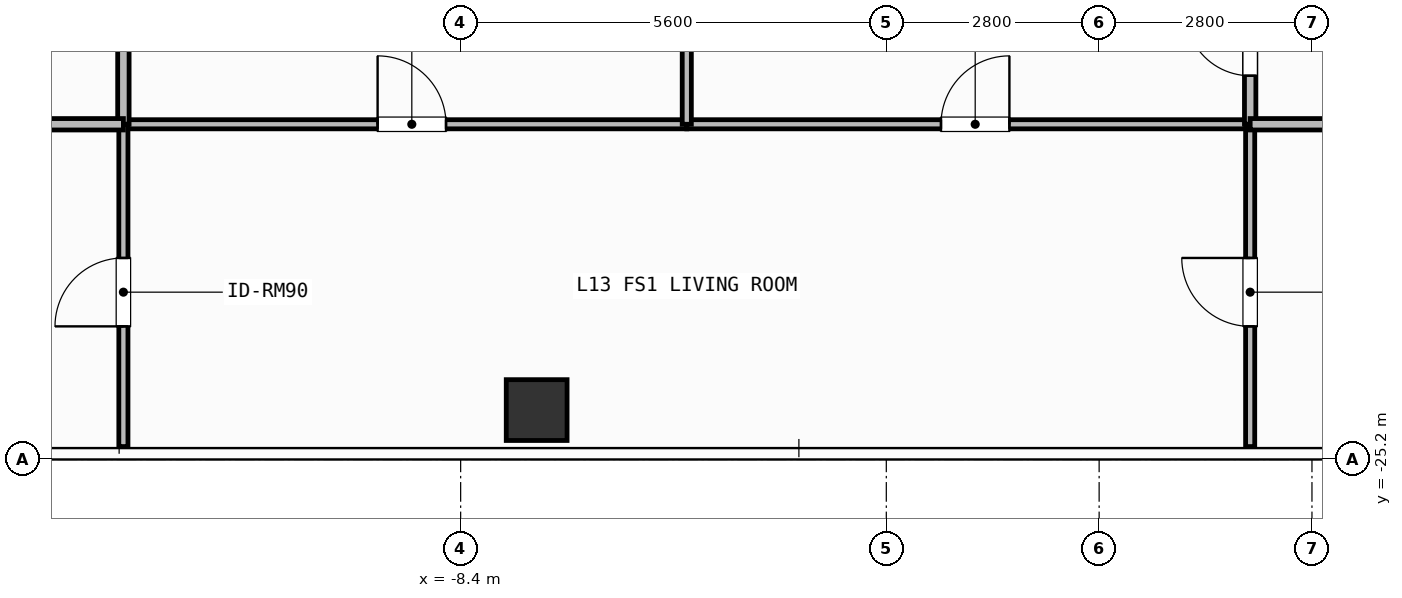
"""IFC4 building model, lengths in metres.
Left out: names, types, materials, properties, quantities, classifications, styles, units other than length and angle.
Written with IfcOpenShell. Run it as: python <this file> out.ifc"""

import sys

from ifc_helpers import new_model, si_unit, direction, frame, frame_2d, origin, origin_2d, place, context, subcontext, project, spatial, rectangle, hollow_rectangle, extrude, element, fill, save


model = new_model("IFC4")
c1 = context("Model", 3, precision=1e-05, world=origin(), true_north=direction((0.0, 1.0)))
c2 = subcontext(c1, "Body", "Model", "MODEL_VIEW")
j1 = project(units=[si_unit("LENGTHUNIT", "METRE"), si_unit("PLANEANGLEUNIT", "RADIAN")], contexts=[c1])
p1 = place(None, origin())
s1 = spatial("IfcSite", under=j1, at=p1, CompositionType="ELEMENT")
p2 = place(p1, origin())
s2 = spatial("IfcBuilding", under=s1, at=p2, CompositionType="ELEMENT")
p3 = place(p2, frame((0.0, 0.0, 50.1)))
s3 = spatial("IfcBuildingStorey", under=s2, at=p3, CompositionType="ELEMENT", Elevation=50.1)
p4 = place(p3, frame((-7.4, -24.55, 0.0), z_axis=(0.0, 0.0, 1.0), x_axis=(1.0, 0.0, 0.0)))
e1 = element("IfcColumn", 1, at=p4, inside=s3, PredefinedType="COLUMN", context=c2, shape_type="SweptSolid", body=[
    extrude(hollow_rectangle(XDim=0.8, YDim=0.8, WallThickness=0.036, at=origin_2d()), origin(), (0.0, 0.0, 1.0), 3.9),
])
p5 = place(p3, frame((-12.837, -20.79, 0.0), z_axis=(0.0, 0.0, 1.0), x_axis=(1.0, 0.0, 0.0)))
e2 = element("IfcWall", 2, at=p5, inside=s3, PredefinedType="PARTITIONING", context=c2, shape_type="SweptSolid", body=[
    extrude(rectangle(XDim=7.412, YDim=0.12, at=frame_2d((3.706, 0.0))), origin(), (0.0, 0.0, 1.0), 3.62),
])
p6 = place(p5, frame((3.344, 0.0, 0.0)))
e3 = element("IfcOpeningElement", 3, at=p6, cuts=e2, PredefinedType="OPENING", context=c2, shape_type="SweptSolid", body=[
    extrude(rectangle(XDim=0.9, YDim=2.1, at=frame_2d((0.45, 1.05))), frame((0.0, 0.07, 0.0), z_axis=(0.0, -1.0, 0.0), x_axis=(1.0, 0.0, 0.0)), (0.0, 0.0, 1.0), 0.14),
])
p7 = place(p3, frame((-5.425, -20.79, 0.0), z_axis=(0.0, 0.0, 1.0), x_axis=(1.0, 0.0, 0.0)))
e4 = element("IfcWall", 4, at=p7, inside=s3, PredefinedType="PARTITIONING", context=c2, shape_type="SweptSolid", body=[
    extrude(rectangle(XDim=7.412, YDim=0.12, at=frame_2d((3.706, 0.0))), origin(), (0.0, 0.0, 1.0), 3.62),
])
p8 = place(p7, frame((3.344, 0.0, 0.0)))
e5 = element("IfcOpeningElement", 5, at=p8, cuts=e4, PredefinedType="OPENING", context=c2, shape_type="SweptSolid", body=[
    extrude(rectangle(XDim=0.9, YDim=2.1, at=frame_2d((0.45, 1.05))), frame((0.0, 0.07, 0.0), z_axis=(0.0, -1.0, 0.0), x_axis=(1.0, 0.0, 0.0)), (0.0, 0.0, 1.0), 0.14),
])
p9 = place(p3, frame((-5.425, -20.79, 0.0), z_axis=(0.0, 0.0, 1.0), x_axis=(0.0, 1.0, 0.0)))
e6 = element("IfcWall", 6, at=p9, inside=s3, PredefinedType="PARTITIONING", context=c2, shape_type="SweptSolid", body=[
    extrude(rectangle(XDim=7.09, YDim=0.12, at=frame_2d((3.545, 0.0))), origin(), (0.0, 0.0, 1.0), 3.62),
])
p10 = place(p9, frame((2.117, 0.0, 0.0)))
e7 = element("IfcOpeningElement", 7, at=p10, cuts=e6, PredefinedType="OPENING", context=c2, shape_type="SweptSolid", body=[
    extrude(rectangle(XDim=0.9, YDim=2.1, at=frame_2d((0.45, 1.05))), frame((0.0, 0.07, 0.0), z_axis=(0.0, -1.0, 0.0), x_axis=(1.0, 0.0, 0.0)), (0.0, 0.0, 1.0), 0.14),
])
p11 = place(p3, frame((-12.837, -20.79, 0.0), z_axis=(0.0, 0.0, 1.0), x_axis=(0.0, 1.0, 0.0)))
e8 = element("IfcWall", 8, at=p11, inside=s3, PredefinedType="PARTITIONING", context=c2, shape_type="SweptSolid", body=[
    extrude(rectangle(XDim=7.09, YDim=0.15, at=frame_2d((3.545, 0.0))), origin(), (0.0, 0.0, 1.0), 3.62),
])
p12 = place(p11, frame((2.133, 0.0, 0.0)))
e9 = element("IfcOpeningElement", 9, at=p12, cuts=e8, PredefinedType="OPENING", context=c2, shape_type="SweptSolid", body=[
    extrude(rectangle(XDim=0.85, YDim=2.1, at=frame_2d((0.425, 1.05))), frame((0.0, 0.085, 0.0), z_axis=(0.0, -1.0, 0.0), x_axis=(1.0, 0.0, 0.0)), (0.0, 0.0, 1.0), 0.17),
])
p13 = place(p3, frame((-12.837, -25.03, 0.0), z_axis=(0.0, 0.0, 1.0), x_axis=(0.0, 1.0, 0.0)))
e10 = element("IfcWall", 10, at=p13, inside=s3, PredefinedType="PARTITIONING", context=c2, shape_type="SweptSolid", body=[
    extrude(rectangle(XDim=4.24, YDim=0.12, at=frame_2d((2.12, 0.0))), origin(), (0.0, 0.0, 1.0), 3.62),
])
p14 = place(p13, frame((1.581, 0.0, 0.0)))
e11 = element("IfcOpeningElement", 11, at=p14, cuts=e10, PredefinedType="OPENING", context=c2, shape_type="SweptSolid", body=[
    extrude(rectangle(XDim=0.9, YDim=2.1, at=frame_2d((0.45, 1.05))), frame((0.0, 0.07, 0.0), z_axis=(0.0, -1.0, 0.0), x_axis=(1.0, 0.0, 0.0)), (0.0, 0.0, 1.0), 0.14),
])
p15 = place(p3, frame((1.987, -20.79, 0.0), z_axis=(0.0, 0.0, 1.0), x_axis=(0.0, 1.0, 0.0)))
e12 = element("IfcWall", 12, at=p15, inside=s3, PredefinedType="PARTITIONING", context=c2, shape_type="SweptSolid", body=[
    extrude(rectangle(XDim=2.127, YDim=0.15, at=frame_2d((1.063, 0.0))), origin(), (0.0, 0.0, 1.0), 3.62),
])
p16 = place(p15, frame((0.638, 0.0, 0.0)))
e13 = element("IfcOpeningElement", 13, at=p16, cuts=e12, PredefinedType="OPENING", context=c2, shape_type="SweptSolid", body=[
    extrude(rectangle(XDim=0.85, YDim=2.1, at=frame_2d((0.425, 1.05))), frame((0.0, 0.085, 0.0), z_axis=(0.0, -1.0, 0.0), x_axis=(1.0, 0.0, 0.0)), (0.0, 0.0, 1.0), 0.17),
])
p17 = place(p3, frame((1.987, -25.03, 0.0), z_axis=(0.0, 0.0, 1.0), x_axis=(0.0, 1.0, 0.0)))
e14 = element("IfcWall", 14, at=p17, inside=s3, PredefinedType="PARTITIONING", context=c2, shape_type="SweptSolid", body=[
    extrude(rectangle(XDim=4.24, YDim=0.12, at=frame_2d((2.12, 0.0))), origin(), (0.0, 0.0, 1.0), 3.62),
])
p18 = place(p17, frame((1.581, 0.0, 0.0)))
e15 = element("IfcOpeningElement", 15, at=p18, cuts=e14, PredefinedType="OPENING", context=c2, shape_type="SweptSolid", body=[
    extrude(rectangle(XDim=0.9, YDim=2.1, at=frame_2d((0.45, 1.05))), frame((0.0, 0.07, 0.0), z_axis=(0.0, -1.0, 0.0), x_axis=(1.0, 0.0, 0.0)), (0.0, 0.0, 1.0), 0.14),
])
p19 = place(p3, frame((-18.62, -20.79, 0.0), z_axis=(0.0, 0.0, 1.0), x_axis=(1.0, 0.0, 0.0)))
e16 = element("IfcWall", 16, at=p19, inside=s3, PredefinedType="PARTITIONING", context=c2, shape_type="SweptSolid", body=[
    extrude(rectangle(XDim=5.783, YDim=0.15, at=frame_2d((2.892, 0.0))), origin(), (0.0, 0.0, 1.0), 3.62),
])
p20 = place(p3, frame((1.987, -20.79, 0.0), z_axis=(0.0, 0.0, 1.0), x_axis=(1.0, 0.0, 0.0)))
e17 = element("IfcWall", 17, at=p20, inside=s3, PredefinedType="PARTITIONING", context=c2, shape_type="SweptSolid", body=[
    extrude(rectangle(XDim=4.356, YDim=0.15, at=frame_2d((2.178, 0.0))), origin(), (0.0, 0.0, 1.0), 3.62),
])
p21 = place(p6, origin())
e18 = element("IfcDoor", 18, at=p21, inside=s3, OperationType="SINGLE_SWING_LEFT", PredefinedType="DOOR", context=c2, shape_type="SweptSolid", body=[
    extrude(rectangle(XDim=0.9, YDim=2.1, at=frame_2d((0.45, 1.05))), frame((0.0, 0.025, 0.0), z_axis=(0.0, -1.0, 0.0), x_axis=(1.0, 0.0, 0.0)), (0.0, 0.0, 1.0), 0.05),
])
fill(e3, e18)
p22 = place(p8, origin())
e19 = element("IfcDoor", 19, at=p22, inside=s3, OperationType="SINGLE_SWING_RIGHT", PredefinedType="DOOR", context=c2, shape_type="SweptSolid", body=[
    extrude(rectangle(XDim=0.9, YDim=2.1, at=frame_2d((0.45, 1.05))), frame((0.0, 0.025, 0.0), z_axis=(0.0, -1.0, 0.0), x_axis=(1.0, 0.0, 0.0)), (0.0, 0.0, 1.0), 0.05),
])
fill(e5, e19)
p23 = place(p14, origin())
e20 = element("IfcDoor", 20, at=p23, inside=s3, OperationType="SINGLE_SWING_LEFT", PredefinedType="DOOR", context=c2, shape_type="SweptSolid", body=[
    extrude(rectangle(XDim=0.9, YDim=2.1, at=frame_2d((0.45, 1.05))), frame((0.0, 0.025, 0.0), z_axis=(0.0, -1.0, 0.0), x_axis=(1.0, 0.0, 0.0)), (0.0, 0.0, 1.0), 0.05),
])
fill(e11, e20)
p24 = place(p16, origin())
e21 = element("IfcDoor", 21, at=p24, inside=s3, OperationType="SINGLE_SWING_RIGHT", PredefinedType="DOOR", context=c2, shape_type="SweptSolid", body=[
    extrude(rectangle(XDim=0.85, YDim=2.1, at=frame_2d((0.425, 1.05))), frame((0.0, 0.025, 0.0), z_axis=(0.0, -1.0, 0.0), x_axis=(1.0, 0.0, 0.0)), (0.0, 0.0, 1.0), 0.05),
])
fill(e13, e21)
p25 = place(p18, origin())
e22 = element("IfcDoor", 22, at=p25, inside=s3, OperationType="SINGLE_SWING_RIGHT", PredefinedType="DOOR", context=c2, shape_type="SweptSolid", body=[
    extrude(rectangle(XDim=0.9, YDim=2.1, at=frame_2d((0.45, 1.05))), frame((0.0, 0.025, 0.0), z_axis=(0.0, -1.0, 0.0), x_axis=(1.0, 0.0, 0.0)), (0.0, 0.0, 1.0), 0.05),
])
fill(e15, e22)
save(model, sys.argv[1])
